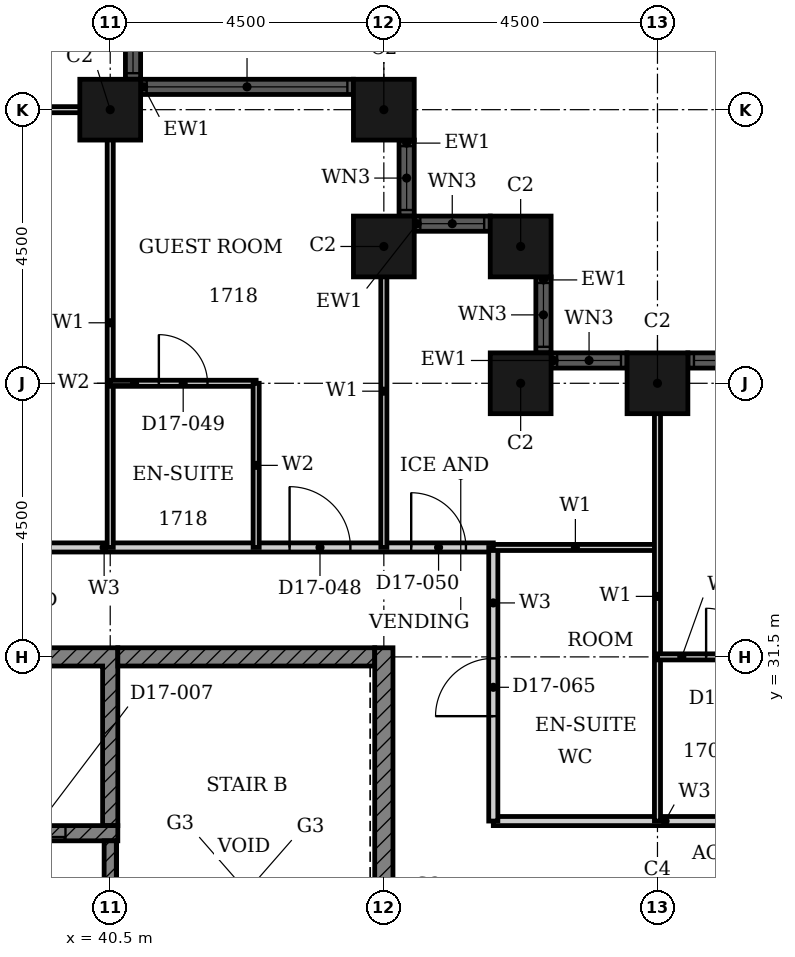
"""IFC4 building model, lengths in metres.
Left out: names, types, materials, properties, quantities, classifications, styles, units other than length and angle.
Written with IfcOpenShell. Run it as: python <this file> out.ifc"""

import sys

from ifc_helpers import new_model, si_unit, direction, frame, frame_2d, origin, origin_2d, place, context, subcontext, project, spatial, polyline, rectangle, hollow_rectangle, outline, extrude, element, fill, save


model = new_model("IFC4")
c1 = context("Model", 3, precision=1e-05, world=origin(), true_north=direction((0.0, 1.0)))
c2 = subcontext(c1, "Body", "Model", "MODEL_VIEW")
j1 = project(units=[si_unit("LENGTHUNIT", "METRE"), si_unit("PLANEANGLEUNIT", "RADIAN")], contexts=[c1])
p1 = place(None, origin())
s1 = spatial("IfcSite", under=j1, at=p1, CompositionType="ELEMENT")
p2 = place(p1, origin())
s2 = spatial("IfcBuilding", under=s1, at=p2, CompositionType="ELEMENT")
p3 = place(p2, frame((0.0, 0.0, 74.4)))
s3 = spatial("IfcBuildingStorey", under=s2, at=p3, CompositionType="ELEMENT", Elevation=74.4)
for number, where, z_axis, x_axis in (
    (1, (49.5, 36.0, 0.0), (0.0, 0.0, 1.0), (1.0, 0.0, 0.0)),
    (2, (47.25, 36.0, 0.0), (0.0, 0.0, 1.0), (1.0, 0.0, 0.0)),
    (3, (47.25, 38.25, 0.0), (0.0, 0.0, 1.0), (1.0, 0.0, 0.0)),
    (4, (45.0, 38.25, 0.0), (0.0, 0.0, 1.0), (1.0, 0.0, 0.0)),
    (5, (45.0, 40.5, 0.0), (0.0, 0.0, 1.0), (1.0, 0.0, 0.0)),
    (6, (40.5, 40.5, 0.0), (0.0, 0.0, 1.0), (1.0, 0.0, 0.0)),
):
    element("IfcColumn", number, at=place(p3, frame(where, z_axis=z_axis, x_axis=x_axis)), inside=s3, PredefinedType="COLUMN", context=c2, shape_type="SweptSolid", body=[
        extrude(hollow_rectangle(XDim=1.0, YDim=1.0, WallThickness=0.032, at=origin_2d()), origin(), (0.0, 0.0, 1.0), 3.6),
    ])
p4 = place(p3, frame((58.0, 36.375, 0.0), z_axis=(0.0, 0.0, 1.0), x_axis=(-1.0, 0.0, 0.0)))
e7 = element("IfcWall", 7, at=p4, inside=s3, PredefinedType="SOLIDWALL", context=c2, shape_type="SweptSolid", body=[
    extrude(rectangle(XDim=8.0, YDim=0.25, at=frame_2d((4.0, 0.0))), origin(), (0.0, 0.0, 1.0), 3.6),
])
p5 = place(p4, frame((0.1, 0.0, 0.9)))
e8 = element("IfcOpeningElement", 8, at=p5, cuts=e7, PredefinedType="OPENING", context=c2, shape_type="SweptSolid", body=[
    extrude(rectangle(XDim=3.3, YDim=2.08, at=frame_2d((1.65, 1.04))), frame((0.0, 0.135, 0.0), z_axis=(0.0, -1.0, 0.0), x_axis=(1.0, 0.0, 0.0)), (0.0, 0.0, 1.0), 0.27),
])
p6 = place(p4, frame((4.6, 0.0, 0.9)))
e9 = element("IfcOpeningElement", 9, at=p6, cuts=e7, PredefinedType="OPENING", context=c2, shape_type="SweptSolid", body=[
    extrude(rectangle(XDim=3.3, YDim=2.08, at=frame_2d((1.65, 1.04))), frame((0.0, 0.135, 0.0), z_axis=(0.0, -1.0, 0.0), x_axis=(1.0, 0.0, 0.0)), (0.0, 0.0, 1.0), 0.27),
])
p7 = place(p3, frame((49.0, 36.375, 0.0), z_axis=(0.0, 0.0, 1.0), x_axis=(-1.0, 0.0, 0.0)))
e10 = element("IfcWall", 10, at=p7, inside=s3, PredefinedType="SOLIDWALL", context=c2, shape_type="SweptSolid", body=[
    extrude(rectangle(XDim=1.25, YDim=0.25, at=frame_2d((0.625, 0.0))), origin(), (0.0, 0.0, 1.0), 3.6),
])
p8 = place(p7, frame((0.1, 0.0, 0.9)))
e11 = element("IfcOpeningElement", 11, at=p8, cuts=e10, PredefinedType="OPENING", context=c2, shape_type="SweptSolid", body=[
    extrude(rectangle(XDim=1.05, YDim=2.08, at=frame_2d((0.525, 1.04))), frame((0.0, 0.135, 0.0), z_axis=(0.0, -1.0, 0.0), x_axis=(1.0, 0.0, 0.0)), (0.0, 0.0, 1.0), 0.27),
])
p9 = place(p3, frame((47.625, 36.5, 0.0), z_axis=(0.0, 0.0, 1.0), x_axis=(0.0, 1.0, 0.0)))
e12 = element("IfcWall", 12, at=p9, inside=s3, PredefinedType="SOLIDWALL", context=c2, shape_type="SweptSolid", body=[
    extrude(rectangle(XDim=1.25, YDim=0.25, at=frame_2d((0.625, 0.0))), origin(), (0.0, 0.0, 1.0), 3.6),
])
p10 = place(p9, frame((0.1, 0.0, 0.9)))
e13 = element("IfcOpeningElement", 13, at=p10, cuts=e12, PredefinedType="OPENING", context=c2, shape_type="SweptSolid", body=[
    extrude(rectangle(XDim=1.05, YDim=2.08, at=frame_2d((0.525, 1.04))), frame((0.0, 0.135, 0.0), z_axis=(0.0, -1.0, 0.0), x_axis=(1.0, 0.0, 0.0)), (0.0, 0.0, 1.0), 0.27),
])
p11 = place(p3, frame((46.75, 38.625, 0.0), z_axis=(0.0, 0.0, 1.0), x_axis=(-1.0, 0.0, 0.0)))
e14 = element("IfcWall", 14, at=p11, inside=s3, PredefinedType="SOLIDWALL", context=c2, shape_type="SweptSolid", body=[
    extrude(rectangle(XDim=1.25, YDim=0.25, at=frame_2d((0.625, 0.0))), origin(), (0.0, 0.0, 1.0), 3.6),
])
p12 = place(p11, frame((0.1, 0.0, 0.9)))
e15 = element("IfcOpeningElement", 15, at=p12, cuts=e14, PredefinedType="OPENING", context=c2, shape_type="SweptSolid", body=[
    extrude(rectangle(XDim=1.05, YDim=2.08, at=frame_2d((0.525, 1.04))), frame((0.0, 0.135, 0.0), z_axis=(0.0, -1.0, 0.0), x_axis=(1.0, 0.0, 0.0)), (0.0, 0.0, 1.0), 0.27),
])
p13 = place(p3, frame((45.375, 38.75, 0.0), z_axis=(0.0, 0.0, 1.0), x_axis=(0.0, 1.0, 0.0)))
e16 = element("IfcWall", 16, at=p13, inside=s3, PredefinedType="SOLIDWALL", context=c2, shape_type="SweptSolid", body=[
    extrude(rectangle(XDim=1.25, YDim=0.25, at=frame_2d((0.625, 0.0))), origin(), (0.0, 0.0, 1.0), 3.6),
])
p14 = place(p13, frame((0.1, 0.0, 0.9)))
e17 = element("IfcOpeningElement", 17, at=p14, cuts=e16, PredefinedType="OPENING", context=c2, shape_type="SweptSolid", body=[
    extrude(rectangle(XDim=1.05, YDim=2.08, at=frame_2d((0.525, 1.04))), frame((0.0, 0.135, 0.0), z_axis=(0.0, -1.0, 0.0), x_axis=(1.0, 0.0, 0.0)), (0.0, 0.0, 1.0), 0.27),
])
p15 = place(p3, frame((44.5, 40.875, 0.0), z_axis=(0.0, 0.0, 1.0), x_axis=(-1.0, 0.0, 0.0)))
e18 = element("IfcWall", 18, at=p15, inside=s3, PredefinedType="SOLIDWALL", context=c2, shape_type="SweptSolid", body=[
    extrude(rectangle(XDim=3.5, YDim=0.25, at=frame_2d((1.75, 0.0))), origin(), (0.0, 0.0, 1.0), 3.6),
])
p16 = place(p15, frame((0.1, 0.0, 0.9)))
e19 = element("IfcOpeningElement", 19, at=p16, cuts=e18, PredefinedType="OPENING", context=c2, shape_type="SweptSolid", body=[
    extrude(rectangle(XDim=3.3, YDim=2.08, at=frame_2d((1.65, 1.04))), frame((0.0, 0.135, 0.0), z_axis=(0.0, -1.0, 0.0), x_axis=(1.0, 0.0, 0.0)), (0.0, 0.0, 1.0), 0.27),
])
p17 = place(p3, frame((40.875, 41.0, 0.0), z_axis=(0.0, 0.0, 1.0), x_axis=(0.0, 1.0, 0.0)))
e20 = element("IfcWall", 20, at=p17, inside=s3, PredefinedType="SOLIDWALL", context=c2, shape_type="SweptSolid", body=[
    extrude(rectangle(XDim=8.0, YDim=0.25, at=frame_2d((4.0, 0.0))), origin(), (0.0, 0.0, 1.0), 3.6),
])
p18 = place(p17, frame((0.1, 0.0, 0.9)))
e21 = element("IfcOpeningElement", 21, at=p18, cuts=e20, PredefinedType="OPENING", context=c2, shape_type="SweptSolid", body=[
    extrude(rectangle(XDim=3.3, YDim=2.08, at=frame_2d((1.65, 1.04))), frame((0.0, 0.135, 0.0), z_axis=(0.0, -1.0, 0.0), x_axis=(1.0, 0.0, 0.0)), (0.0, 0.0, 1.0), 0.27),
])
p19 = place(p17, frame((4.6, 0.0, 0.9)))
e22 = element("IfcOpeningElement", 22, at=p19, cuts=e20, PredefinedType="OPENING", context=c2, shape_type="SweptSolid", body=[
    extrude(rectangle(XDim=3.3, YDim=2.08, at=frame_2d((1.65, 1.04))), frame((0.0, 0.135, 0.0), z_axis=(0.0, -1.0, 0.0), x_axis=(1.0, 0.0, 0.0)), (0.0, 0.0, 1.0), 0.27),
])
p20 = place(p3, origin())
e23 = element("IfcWall", 23, at=p20, inside=s3, PredefinedType="SHEAR", context=c2, shape_type="SweptSolid", body=[
    extrude(outline(polyline([(24.947, 28.725), (25.197, 28.725), (25.197, 31.35), (27.518, 31.35), (27.518, 28.725), (27.768, 28.725), (27.768, 31.35), (30.089, 31.35), (30.089, 28.725), (30.339, 28.725), (30.339, 31.35), (32.661, 31.35), (32.661, 28.725), (32.911, 28.725), (32.911, 31.35), (35.232, 31.35), (35.232, 28.725), (35.482, 28.725), (35.482, 31.35), (37.803, 31.35), (37.803, 28.725), (38.053, 28.725), (38.053, 31.35), (40.375, 31.35), (40.375, 28.725), (40.625, 28.725), (40.625, 31.65), (24.947, 31.65), (24.947, 28.725)])), origin(), (0.0, 0.0, 1.0), 3.3),
])
p21 = place(p3, frame((40.625, 31.5, 0.0), z_axis=(0.0, 0.0, 1.0), x_axis=(1.0, 0.0, 0.0)))
e24 = element("IfcWall", 24, at=p21, inside=s3, PredefinedType="SHEAR", context=c2, shape_type="SweptSolid", body=[
    extrude(rectangle(XDim=4.225, YDim=0.3, at=frame_2d((2.113, 0.0))), origin(), (0.0, 0.0, 1.0), 3.3),
])
p22 = place(p3, frame((45.0, 22.35, 0.0), z_axis=(0.0, 0.0, 1.0), x_axis=(0.0, 1.0, 0.0)))
e25 = element("IfcWall", 25, at=p22, inside=s3, PredefinedType="SHEAR", context=c2, shape_type="SweptSolid", body=[
    extrude(rectangle(XDim=9.3, YDim=0.3, at=frame_2d((4.65, 0.0))), origin(), (0.0, 0.0, 1.0), 3.3),
])
p23 = place(p3, frame((24.947, 28.6, 0.0), z_axis=(0.0, 0.0, 1.0), x_axis=(1.0, 0.0, 0.0)))
e26 = element("IfcWall", 26, at=p23, inside=s3, PredefinedType="SHEAR", context=c2, shape_type="SweptSolid", body=[
    extrude(rectangle(XDim=15.678, YDim=0.25, at=frame_2d((7.839, 0.0))), origin(), (0.0, 0.0, 1.0), 3.3),
])
p24 = place(p23, frame((0.861, 0.0, 0.0)))
e27 = element("IfcOpeningElement", 27, at=p24, cuts=e26, PredefinedType="OPENING", context=c2, shape_type="SweptSolid", body=[
    extrude(rectangle(XDim=1.1, YDim=2.1, at=frame_2d((0.55, 1.05))), frame((0.0, 0.135, 0.0), z_axis=(0.0, -1.0, 0.0), x_axis=(1.0, 0.0, 0.0)), (0.0, 0.0, 1.0), 0.27),
])
p25 = place(p23, frame((8.575, 0.0, 0.0)))
e28 = element("IfcOpeningElement", 28, at=p25, cuts=e26, PredefinedType="OPENING", context=c2, shape_type="SweptSolid", body=[
    extrude(rectangle(XDim=1.1, YDim=2.1, at=frame_2d((0.55, 1.05))), frame((0.0, 0.135, 0.0), z_axis=(0.0, -1.0, 0.0), x_axis=(1.0, 0.0, 0.0)), (0.0, 0.0, 1.0), 0.27),
])
p26 = place(p23, frame((13.718, 0.0, 0.0)))
e29 = element("IfcOpeningElement", 29, at=p26, cuts=e26, PredefinedType="OPENING", context=c2, shape_type="SweptSolid", body=[
    extrude(rectangle(XDim=1.1, YDim=2.1, at=frame_2d((0.55, 1.05))), frame((0.0, 0.135, 0.0), z_axis=(0.0, -1.0, 0.0), x_axis=(1.0, 0.0, 0.0)), (0.0, 0.0, 1.0), 0.27),
])
p27 = place(p3, frame((40.5, 22.65, 0.0), z_axis=(0.0, 0.0, 1.0), x_axis=(0.0, 1.0, 0.0)))
e30 = element("IfcWall", 30, at=p27, inside=s3, PredefinedType="SHEAR", context=c2, shape_type="SweptSolid", body=[
    extrude(rectangle(XDim=5.825, YDim=0.2, at=frame_2d((2.913, 0.0))), origin(), (0.0, 0.0, 1.0), 3.3),
])
p28 = place(p27, frame((0.25, 0.0, 0.0)))
e31 = element("IfcOpeningElement", 31, at=p28, cuts=e30, PredefinedType="OPENING", context=c2, shape_type="SweptSolid", body=[
    extrude(rectangle(XDim=1.8, YDim=2.1, at=frame_2d((0.9, 1.05))), frame((0.0, 0.11, 0.0), z_axis=(0.0, -1.0, 0.0), x_axis=(1.0, 0.0, 0.0)), (0.0, 0.0, 1.0), 0.22),
])
p29 = place(p3, frame((46.8, 28.8, 0.0), z_axis=(0.0, 0.0, 1.0), x_axis=(1.0, 0.0, 0.0)))
e32 = element("IfcWall", 32, at=p29, inside=s3, PredefinedType="PARTITIONING", context=c2, shape_type="SweptSolid", body=[
    extrude(rectangle(XDim=11.7, YDim=0.15, at=frame_2d((5.85, 0.0))), origin(), (0.0, 0.0, 1.0), 3.3),
])
p30 = place(p29, frame((5.65, 0.0, 0.0)))
e33 = element("IfcOpeningElement", 33, at=p30, cuts=e32, PredefinedType="OPENING", context=c2, shape_type="SweptSolid", body=[
    extrude(rectangle(XDim=1.0, YDim=2.1, at=frame_2d((0.5, 1.05))), frame((0.0, 0.085, 0.0), z_axis=(0.0, -1.0, 0.0), x_axis=(1.0, 0.0, 0.0)), (0.0, 0.0, 1.0), 0.17),
])
p31 = place(p29, frame((10.15, 0.0, 0.0)))
e34 = element("IfcOpeningElement", 34, at=p31, cuts=e32, PredefinedType="OPENING", context=c2, shape_type="SweptSolid", body=[
    extrude(rectangle(XDim=1.0, YDim=2.1, at=frame_2d((0.5, 1.05))), frame((0.0, 0.085, 0.0), z_axis=(0.0, -1.0, 0.0), x_axis=(1.0, 0.0, 0.0)), (0.0, 0.0, 1.0), 0.17),
])
p32 = place(p3, frame((33.3, 33.3, 0.0), z_axis=(0.0, 0.0, 1.0), x_axis=(1.0, 0.0, 0.0)))
e35 = element("IfcWall", 35, at=p32, inside=s3, PredefinedType="PARTITIONING", context=c2, shape_type="SweptSolid", body=[
    extrude(rectangle(XDim=13.5, YDim=0.15, at=frame_2d((6.75, 0.0))), origin(), (0.0, 0.0, 1.0), 3.3),
])
p33 = place(p32, frame((10.15, 0.0, 0.0)))
e36 = element("IfcOpeningElement", 36, at=p33, cuts=e35, PredefinedType="OPENING", context=c2, shape_type="SweptSolid", body=[
    extrude(rectangle(XDim=1.0, YDim=2.1, at=frame_2d((0.5, 1.05))), frame((0.0, 0.085, 0.0), z_axis=(0.0, -1.0, 0.0), x_axis=(1.0, 0.0, 0.0)), (0.0, 0.0, 1.0), 0.17),
])
p34 = place(p32, frame((12.15, 0.0, 0.0)))
e37 = element("IfcOpeningElement", 37, at=p34, cuts=e35, PredefinedType="OPENING", context=c2, shape_type="SweptSolid", body=[
    extrude(rectangle(XDim=0.9, YDim=2.1, at=frame_2d((0.45, 1.05))), frame((0.0, 0.085, 0.0), z_axis=(0.0, -1.0, 0.0), x_axis=(1.0, 0.0, 0.0)), (0.0, 0.0, 1.0), 0.17),
])
p35 = place(p32, frame((3.15, 0.0, 0.0)))
e38 = element("IfcOpeningElement", 38, at=p35, cuts=e35, PredefinedType="OPENING", context=c2, shape_type="SweptSolid", body=[
    extrude(rectangle(XDim=0.9, YDim=2.1, at=frame_2d((0.45, 1.05))), frame((0.0, 0.085, 0.0), z_axis=(0.0, -1.0, 0.0), x_axis=(1.0, 0.0, 0.0)), (0.0, 0.0, 1.0), 0.17),
])
p36 = place(p3, frame((46.8, 28.8, 0.0), z_axis=(0.0, 0.0, 1.0), x_axis=(0.0, 1.0, 0.0)))
e39 = element("IfcWall", 39, at=p36, inside=s3, PredefinedType="PARTITIONING", context=c2, shape_type="SweptSolid", body=[
    extrude(rectangle(XDim=4.5, YDim=0.15, at=frame_2d((2.25, 0.0))), origin(), (0.0, 0.0, 1.0), 3.3),
])
p37 = place(p36, frame((1.725, 0.0, 0.0)))
e40 = element("IfcOpeningElement", 40, at=p37, cuts=e39, PredefinedType="OPENING", context=c2, shape_type="SweptSolid", body=[
    extrude(rectangle(XDim=0.95, YDim=2.1, at=frame_2d((0.475, 1.05))), frame((0.0, 0.085, 0.0), z_axis=(0.0, -1.0, 0.0), x_axis=(1.0, 0.0, 0.0)), (0.0, 0.0, 1.0), 0.17),
])
p38 = place(p3, frame((46.8, 33.3, 0.0), z_axis=(0.0, 0.0, 1.0), x_axis=(1.0, 0.0, 0.0)))
e41 = element("IfcWall", 41, at=p38, inside=s3, PredefinedType="PARTITIONING", context=c2, shape_type="SweptSolid", body=[
    extrude(rectangle(XDim=2.7, YDim=0.1, at=frame_2d((1.35, 0.0))), origin(), (0.0, 0.0, 1.0), 3.3),
])
p39 = place(p3, frame((33.3, 40.5, 0.0), z_axis=(0.0, 0.0, 1.0), x_axis=(1.0, 0.0, 0.0)))
e42 = element("IfcWall", 42, at=p39, inside=s3, PredefinedType="PARTITIONING", context=c2, shape_type="SweptSolid", body=[
    extrude(rectangle(XDim=7.39, YDim=0.1, at=frame_2d((3.695, 0.0))), origin(), (0.0, 0.0, 1.0), 2.38),
])
p40 = place(p3, frame((40.5, 33.3, 0.0), z_axis=(0.0, 0.0, 1.0), x_axis=(0.0, 1.0, 0.0)))
e43 = element("IfcWall", 43, at=p40, inside=s3, PredefinedType="PARTITIONING", context=c2, shape_type="SweptSolid", body=[
    extrude(rectangle(XDim=7.39, YDim=0.1, at=frame_2d((3.695, 0.0))), origin(), (0.0, 0.0, 1.0), 3.3),
])
p41 = place(p3, frame((45.0, 33.3, 0.0), z_axis=(0.0, 0.0, 1.0), x_axis=(0.0, 1.0, 0.0)))
e44 = element("IfcWall", 44, at=p41, inside=s3, PredefinedType="PARTITIONING", context=c2, shape_type="SweptSolid", body=[
    extrude(rectangle(XDim=5.14, YDim=0.1, at=frame_2d((2.57, 0.0))), origin(), (0.0, 0.0, 1.0), 3.3),
])
p42 = place(p3, frame((49.5, 28.8, 0.0), z_axis=(0.0, 0.0, 1.0), x_axis=(0.0, 1.0, 0.0)))
e45 = element("IfcWall", 45, at=p42, inside=s3, PredefinedType="PARTITIONING", context=c2, shape_type="SweptSolid", body=[
    extrude(rectangle(XDim=7.39, YDim=0.1, at=frame_2d((3.695, 0.0))), origin(), (0.0, 0.0, 1.0), 2.38),
])
p43 = place(p3, frame((49.5, 31.5, 0.0), z_axis=(0.0, 0.0, 1.0), x_axis=(1.0, 0.0, 0.0)))
e46 = element("IfcWall", 46, at=p43, inside=s3, PredefinedType="PARTITIONING", context=c2, shape_type="SweptSolid", body=[
    extrude(rectangle(XDim=2.4, YDim=0.1, at=frame_2d((1.2, 0.0))), origin(), (0.0, 0.0, 1.0), 2.58),
])
p44 = place(p43, frame((0.8, 0.0, 0.0)))
e47 = element("IfcOpeningElement", 47, at=p44, cuts=e46, PredefinedType="OPENING", context=c2, shape_type="SweptSolid", body=[
    extrude(rectangle(XDim=0.8, YDim=2.1, at=frame_2d((0.4, 1.05))), frame((0.0, 0.06, 0.0), z_axis=(0.0, -1.0, 0.0), x_axis=(1.0, 0.0, 0.0)), (0.0, 0.0, 1.0), 0.12),
])
p45 = place(p3, frame((40.5, 36.0, 0.0), z_axis=(0.0, 0.0, 1.0), x_axis=(1.0, 0.0, 0.0)))
e48 = element("IfcWall", 48, at=p45, inside=s3, PredefinedType="PARTITIONING", context=c2, shape_type="SweptSolid", body=[
    extrude(rectangle(XDim=2.4, YDim=0.1, at=frame_2d((1.2, 0.0))), origin(), (0.0, 0.0, 1.0), 3.3),
])
p46 = place(p45, frame((0.8, 0.0, 0.0)))
e49 = element("IfcOpeningElement", 49, at=p46, cuts=e48, PredefinedType="OPENING", context=c2, shape_type="SweptSolid", body=[
    extrude(rectangle(XDim=0.8, YDim=2.1, at=frame_2d((0.4, 1.05))), frame((0.0, 0.06, 0.0), z_axis=(0.0, -1.0, 0.0), x_axis=(1.0, 0.0, 0.0)), (0.0, 0.0, 1.0), 0.12),
])
p47 = place(p3, frame((42.9, 33.3, 0.0), z_axis=(0.0, 0.0, 1.0), x_axis=(0.0, 1.0, 0.0)))
e50 = element("IfcWall", 50, at=p47, inside=s3, PredefinedType="PARTITIONING", context=c2, shape_type="SweptSolid", body=[
    extrude(rectangle(XDim=2.7, YDim=0.1, at=frame_2d((1.35, 0.0))), origin(), (0.0, 0.0, 1.0), 3.3),
])
p48 = place(p6, origin())
e51 = element("IfcWindow", 51, at=p48, inside=s3, PartitioningType="SINGLE_PANEL", PredefinedType="WINDOW", context=c2, shape_type="SweptSolid", body=[
    extrude(rectangle(XDim=3.3, YDim=2.08, at=frame_2d((1.65, 1.04))), frame((0.0, 0.03, 0.0), z_axis=(0.0, -1.0, 0.0), x_axis=(1.0, 0.0, 0.0)), (0.0, 0.0, 1.0), 0.06),
])
fill(e9, e51)
p49 = place(p8, origin())
e52 = element("IfcWindow", 52, at=p49, inside=s3, PartitioningType="SINGLE_PANEL", PredefinedType="WINDOW", context=c2, shape_type="SweptSolid", body=[
    extrude(rectangle(XDim=1.05, YDim=2.08, at=frame_2d((0.525, 1.04))), frame((0.0, 0.03, 0.0), z_axis=(0.0, -1.0, 0.0), x_axis=(1.0, 0.0, 0.0)), (0.0, 0.0, 1.0), 0.06),
])
fill(e11, e52)
p50 = place(p10, origin())
e53 = element("IfcWindow", 53, at=p50, inside=s3, PartitioningType="SINGLE_PANEL", PredefinedType="WINDOW", context=c2, shape_type="SweptSolid", body=[
    extrude(rectangle(XDim=1.05, YDim=2.08, at=frame_2d((0.525, 1.04))), frame((0.0, 0.03, 0.0), z_axis=(0.0, -1.0, 0.0), x_axis=(1.0, 0.0, 0.0)), (0.0, 0.0, 1.0), 0.06),
])
fill(e13, e53)
p51 = place(p12, origin())
e54 = element("IfcWindow", 54, at=p51, inside=s3, PartitioningType="SINGLE_PANEL", PredefinedType="WINDOW", context=c2, shape_type="SweptSolid", body=[
    extrude(rectangle(XDim=1.05, YDim=2.08, at=frame_2d((0.525, 1.04))), frame((0.0, 0.03, 0.0), z_axis=(0.0, -1.0, 0.0), x_axis=(1.0, 0.0, 0.0)), (0.0, 0.0, 1.0), 0.06),
])
fill(e15, e54)
p52 = place(p14, origin())
e55 = element("IfcWindow", 55, at=p52, inside=s3, PartitioningType="SINGLE_PANEL", PredefinedType="WINDOW", context=c2, shape_type="SweptSolid", body=[
    extrude(rectangle(XDim=1.05, YDim=2.08, at=frame_2d((0.525, 1.04))), frame((0.0, 0.03, 0.0), z_axis=(0.0, -1.0, 0.0), x_axis=(1.0, 0.0, 0.0)), (0.0, 0.0, 1.0), 0.06),
])
fill(e17, e55)
p53 = place(p16, origin())
e56 = element("IfcWindow", 56, at=p53, inside=s3, PartitioningType="SINGLE_PANEL", PredefinedType="WINDOW", context=c2, shape_type="SweptSolid", body=[
    extrude(rectangle(XDim=3.3, YDim=2.08, at=frame_2d((1.65, 1.04))), frame((0.0, 0.03, 0.0), z_axis=(0.0, -1.0, 0.0), x_axis=(1.0, 0.0, 0.0)), (0.0, 0.0, 1.0), 0.06),
])
fill(e19, e56)
p54 = place(p18, origin())
e57 = element("IfcWindow", 57, at=p54, inside=s3, PartitioningType="SINGLE_PANEL", PredefinedType="WINDOW", context=c2, shape_type="SweptSolid", body=[
    extrude(rectangle(XDim=3.3, YDim=2.08, at=frame_2d((1.65, 1.04))), frame((0.0, 0.03, 0.0), z_axis=(0.0, -1.0, 0.0), x_axis=(1.0, 0.0, 0.0)), (0.0, 0.0, 1.0), 0.06),
])
fill(e21, e57)
p55 = place(p26, origin())
e58 = element("IfcDoor", 58, at=p55, inside=s3, OperationType="DOUBLE_DOOR_SLIDING", PredefinedType="DOOR", context=c2, shape_type="SweptSolid", body=[
    extrude(rectangle(XDim=1.1, YDim=2.1, at=frame_2d((0.55, 1.05))), frame((0.0, 0.025, 0.0), z_axis=(0.0, -1.0, 0.0), x_axis=(1.0, 0.0, 0.0)), (0.0, 0.0, 1.0), 0.05),
])
fill(e29, e58)
p56 = place(p44, origin())
e59 = element("IfcDoor", 59, at=p56, inside=s3, OperationType="SINGLE_SWING_LEFT", PredefinedType="DOOR", context=c2, shape_type="SweptSolid", body=[
    extrude(rectangle(XDim=0.8, YDim=2.1, at=frame_2d((0.4, 1.05))), frame((0.0, 0.025, 0.0), z_axis=(0.0, -1.0, 0.0), x_axis=(1.0, 0.0, 0.0)), (0.0, 0.0, 1.0), 0.05),
])
fill(e47, e59)
p57 = place(p33, origin())
e60 = element("IfcDoor", 60, at=p57, inside=s3, OperationType="SINGLE_SWING_RIGHT", PredefinedType="DOOR", context=c2, shape_type="SweptSolid", body=[
    extrude(rectangle(XDim=1.0, YDim=2.1, at=frame_2d((0.5, 1.05))), frame((0.0, 0.025, 0.0), z_axis=(0.0, -1.0, 0.0), x_axis=(1.0, 0.0, 0.0)), (0.0, 0.0, 1.0), 0.05),
])
fill(e36, e60)
p58 = place(p46, origin())
e61 = element("IfcDoor", 61, at=p58, inside=s3, OperationType="SINGLE_SWING_RIGHT", PredefinedType="DOOR", context=c2, shape_type="SweptSolid", body=[
    extrude(rectangle(XDim=0.8, YDim=2.1, at=frame_2d((0.4, 1.05))), frame((0.0, 0.025, 0.0), z_axis=(0.0, -1.0, 0.0), x_axis=(1.0, 0.0, 0.0)), (0.0, 0.0, 1.0), 0.05),
])
fill(e49, e61)
p59 = place(p34, origin())
e62 = element("IfcDoor", 62, at=p59, inside=s3, OperationType="SINGLE_SWING_RIGHT", PredefinedType="DOOR", context=c2, shape_type="SweptSolid", body=[
    extrude(rectangle(XDim=0.9, YDim=2.1, at=frame_2d((0.45, 1.05))), frame((0.0, 0.025, 0.0), z_axis=(0.0, -1.0, 0.0), x_axis=(1.0, 0.0, 0.0)), (0.0, 0.0, 1.0), 0.05),
])
fill(e37, e62)
p60 = place(p37, origin())
e63 = element("IfcDoor", 63, at=p60, inside=s3, OperationType="SINGLE_SWING_RIGHT", PredefinedType="DOOR", context=c2, shape_type="SweptSolid", body=[
    extrude(rectangle(XDim=0.95, YDim=2.1, at=frame_2d((0.475, 1.05))), frame((0.0, 0.025, 0.0), z_axis=(0.0, -1.0, 0.0), x_axis=(1.0, 0.0, 0.0)), (0.0, 0.0, 1.0), 0.05),
])
fill(e40, e63)
save(model, sys.argv[1])
